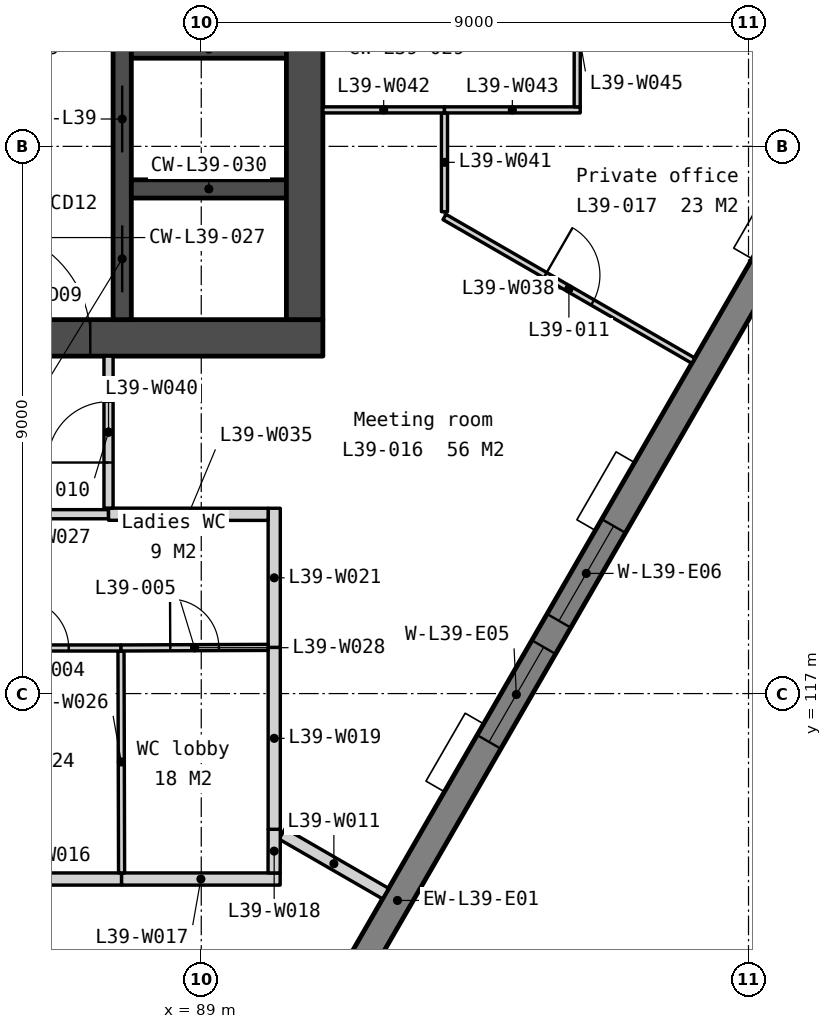
"""IFC4 building model, lengths in metres.
Left out: names, types, materials, properties, quantities, classifications, styles, units other than length and angle.
Written with IfcOpenShell. Run it as: python <this file> out.ifc"""

import sys

from ifc_helpers import new_model, si_unit, direction, frame, frame_2d, origin, place, context, subcontext, project, spatial, polyline, rectangle, outline, extrude, element, fill, save


model = new_model("IFC4")
c1 = context("Model", 3, precision=1e-05, world=origin(), true_north=direction((0.0, 1.0)))
c2 = subcontext(c1, "Body", "Model", "MODEL_VIEW")
j1 = project(units=[si_unit("LENGTHUNIT", "METRE"), si_unit("PLANEANGLEUNIT", "RADIAN")], contexts=[c1])
p1 = place(None, origin())
s1 = spatial("IfcSite", under=j1, at=p1, CompositionType="ELEMENT")
p2 = place(p1, origin())
s2 = spatial("IfcBuilding", under=s1, at=p2, CompositionType="ELEMENT")
p3 = place(p2, frame((0.0, 0.0, 155.9)))
s3 = spatial("IfcBuildingStorey", under=s2, at=p3, CompositionType="ELEMENT", Elevation=155.9)
p4 = place(p3, frame((69.0, 122.85, 0.0), z_axis=(0.0, 0.0, 1.0), x_axis=(1.0, 0.0, 0.0)))
e1 = element("IfcWall", 1, at=p4, inside=s3, PredefinedType="SOLIDWALL", context=c2, shape_type="SweptSolid", body=[
    extrude(rectangle(XDim=22.0, YDim=0.6, at=frame_2d((11.0, 0.0))), origin(), (0.0, 0.0, 1.0), 3.75),
])
p5 = place(p4, frame((16.375, 0.0, 0.0)))
e2 = element("IfcOpeningElement", 2, at=p5, cuts=e1, PredefinedType="OPENING", context=c2, shape_type="SweptSolid", body=[
    extrude(rectangle(XDim=1.8, YDim=2.1, at=frame_2d((0.9, 1.05))), frame((0.0, 0.31, 0.0), z_axis=(0.0, -1.0, 0.0), x_axis=(1.0, 0.0, 0.0)), (0.0, 0.0, 1.0), 0.62),
])
p6 = place(p4, frame((3.825, 0.0, 0.0)))
e3 = element("IfcOpeningElement", 3, at=p6, cuts=e1, PredefinedType="OPENING", context=c2, shape_type="SweptSolid", body=[
    extrude(rectangle(XDim=1.8, YDim=2.1, at=frame_2d((0.9, 1.05))), frame((0.0, 0.31, 0.0), z_axis=(0.0, -1.0, 0.0), x_axis=(1.0, 0.0, 0.0)), (0.0, 0.0, 1.0), 0.62),
])
p7 = place(p4, frame((12.85, 0.0, 0.0)))
e4 = element("IfcOpeningElement", 4, at=p7, cuts=e1, PredefinedType="OPENING", context=c2, shape_type="SweptSolid", body=[
    extrude(rectangle(XDim=1.5, YDim=2.1, at=frame_2d((0.75, 1.05))), frame((0.0, 0.31, 0.0), z_axis=(0.0, -1.0, 0.0), x_axis=(1.0, 0.0, 0.0)), (0.0, 0.0, 1.0), 0.62),
])
p8 = place(p3, frame((87.7, 133.95, 0.0), z_axis=(0.0, 0.0, 1.0), x_axis=(0.0, -1.0, 0.0)))
e5 = element("IfcWall", 5, at=p8, inside=s3, PredefinedType="SOLIDWALL", context=c2, shape_type="SweptSolid", body=[
    extrude(rectangle(XDim=10.8, YDim=0.3, at=frame_2d((5.4, 0.0))), origin(), (0.0, 0.0, 1.0), 3.75),
])
p9 = place(p8, frame((6.95, 0.0, 0.0)))
e6 = element("IfcOpeningElement", 6, at=p9, cuts=e5, PredefinedType="OPENING", context=c2, shape_type="SweptSolid", body=[
    extrude(rectangle(XDim=1.1, YDim=2.1, at=frame_2d((0.55, 1.05))), frame((0.0, 0.16, 0.0), z_axis=(0.0, -1.0, 0.0), x_axis=(1.0, 0.0, 0.0)), (0.0, 0.0, 1.0), 0.32),
])
p10 = place(p8, frame((5.1, 0.0, 0.0)))
e7 = element("IfcOpeningElement", 7, at=p10, cuts=e5, PredefinedType="OPENING", context=c2, shape_type="SweptSolid", body=[
    extrude(rectangle(XDim=1.0, YDim=2.1, at=frame_2d((0.5, 1.05))), frame((0.0, 0.16, 0.0), z_axis=(0.0, -1.0, 0.0), x_axis=(1.0, 0.0, 0.0)), (0.0, 0.0, 1.0), 0.32),
])
p11 = place(p8, frame((9.25, 0.0, 0.0)))
e8 = element("IfcOpeningElement", 8, at=p11, cuts=e5, PredefinedType="OPENING", context=c2, shape_type="SweptSolid", body=[
    extrude(rectangle(XDim=1.1, YDim=2.1, at=frame_2d((0.55, 1.05))), frame((0.0, 0.16, 0.0), z_axis=(0.0, -1.0, 0.0), x_axis=(1.0, 0.0, 0.0)), (0.0, 0.0, 1.0), 0.32),
])
for number, where, z_axis, x_axis in (
    (9, (87.85, 127.6, 0.0), (0.0, 0.0, 1.0), (1.0, 0.0, 0.0)),
    (10, (87.85, 125.3, 0.0), (0.0, 0.0, 1.0), (1.0, 0.0, 0.0)),
):
    element("IfcWall", number, at=place(p3, frame(where, z_axis=z_axis, x_axis=x_axis)), inside=s3, PredefinedType="SOLIDWALL", context=c2, shape_type="SweptSolid", body=[
        extrude(rectangle(XDim=2.55, YDim=0.3, at=frame_2d((1.275, 0.0))), origin(), (0.0, 0.0, 1.0), 3.75),
    ])
p12 = place(p3, frame((90.7, 133.95, 0.0), z_axis=(0.0, 0.0, 1.0), x_axis=(0.0, -1.0, 0.0)))
e11 = element("IfcWall", 11, at=p12, inside=s3, PredefinedType="SOLIDWALL", context=c2, shape_type="SweptSolid", body=[
    extrude(rectangle(XDim=10.8, YDim=0.6, at=frame_2d((5.4, 0.0))), origin(), (0.0, 0.0, 1.0), 3.75),
])
p13 = place(p3, frame((82.105, 96.067, -0.15), z_axis=(0.0, 0.0, 1.0), x_axis=(0.499997369791, 0.866026922331, 0.0)))
e12 = element("IfcWall", 12, at=p13, inside=s3, PredefinedType="SOLIDWALL", context=c2, shape_type="SweptSolid", body=[
    extrude(outline(polyline([(40.486, 0.0), (40.486, 3.9), (0.0, 3.9), (0.0, 0.0), (40.486, 0.0)])), frame((0.0, 0.225, 0.0), z_axis=(0.0, -1.0, 0.0), x_axis=(1.0, 0.0, 0.0)), (0.0, 0.0, 1.0), 0.45),
])
p14 = place(p13, frame((3.011, 0.0, 0.95)))
e13 = element("IfcOpeningElement", 13, at=p14, cuts=e12, PredefinedType="OPENING", context=c2, shape_type="SweptSolid", body=[
    extrude(rectangle(XDim=1.8, YDim=2.2, at=frame_2d((0.9, 1.1))), frame((0.0, 0.235, 0.0), z_axis=(0.0, -1.0, 0.0), x_axis=(1.0, 0.0, 0.0)), (0.0, 0.0, 1.0), 0.47),
])
p15 = place(p13, frame((5.311, 0.0, 0.95)))
e14 = element("IfcOpeningElement", 14, at=p15, cuts=e12, PredefinedType="OPENING", context=c2, shape_type="SweptSolid", body=[
    extrude(rectangle(XDim=1.8, YDim=2.2, at=frame_2d((0.9, 1.1))), frame((0.0, 0.235, 0.0), z_axis=(0.0, -1.0, 0.0), x_axis=(1.0, 0.0, 0.0)), (0.0, 0.0, 1.0), 0.47),
])
p16 = place(p13, frame((13.132, 0.0, 0.95)))
e15 = element("IfcOpeningElement", 15, at=p16, cuts=e12, PredefinedType="OPENING", context=c2, shape_type="SweptSolid", body=[
    extrude(rectangle(XDim=1.8, YDim=2.2, at=frame_2d((0.9, 1.1))), frame((0.0, 0.235, 0.0), z_axis=(0.0, -1.0, 0.0), x_axis=(1.0, 0.0, 0.0)), (0.0, 0.0, 1.0), 0.47),
])
p17 = place(p13, frame((15.432, 0.0, 0.95)))
e16 = element("IfcOpeningElement", 16, at=p17, cuts=e12, PredefinedType="OPENING", context=c2, shape_type="SweptSolid", body=[
    extrude(rectangle(XDim=1.8, YDim=2.2, at=frame_2d((0.9, 1.1))), frame((0.0, 0.235, 0.0), z_axis=(0.0, -1.0, 0.0), x_axis=(1.0, 0.0, 0.0)), (0.0, 0.0, 1.0), 0.47),
])
p18 = place(p13, frame((23.254, 0.0, 0.95)))
e17 = element("IfcOpeningElement", 17, at=p18, cuts=e12, PredefinedType="OPENING", context=c2, shape_type="SweptSolid", body=[
    extrude(rectangle(XDim=1.8, YDim=2.2, at=frame_2d((0.9, 1.1))), frame((0.0, 0.235, 0.0), z_axis=(0.0, -1.0, 0.0), x_axis=(1.0, 0.0, 0.0)), (0.0, 0.0, 1.0), 0.47),
])
p19 = place(p13, frame((25.554, 0.0, 0.95)))
e18 = element("IfcOpeningElement", 18, at=p19, cuts=e12, PredefinedType="OPENING", context=c2, shape_type="SweptSolid", body=[
    extrude(rectangle(XDim=1.8, YDim=2.2, at=frame_2d((0.9, 1.1))), frame((0.0, 0.235, 0.0), z_axis=(0.0, -1.0, 0.0), x_axis=(1.0, 0.0, 0.0)), (0.0, 0.0, 1.0), 0.47),
])
p20 = place(p13, frame((33.375, 0.0, 0.95)))
e19 = element("IfcOpeningElement", 19, at=p20, cuts=e12, PredefinedType="OPENING", context=c2, shape_type="SweptSolid", body=[
    extrude(rectangle(XDim=1.8, YDim=2.2, at=frame_2d((0.9, 1.1))), frame((0.0, 0.235, 0.0), z_axis=(0.0, -1.0, 0.0), x_axis=(1.0, 0.0, 0.0)), (0.0, 0.0, 1.0), 0.47),
])
p21 = place(p13, frame((35.675, 0.0, 0.95)))
e20 = element("IfcOpeningElement", 20, at=p21, cuts=e12, PredefinedType="OPENING", context=c2, shape_type="SweptSolid", body=[
    extrude(rectangle(XDim=1.8, YDim=2.2, at=frame_2d((0.9, 1.1))), frame((0.0, 0.235, 0.0), z_axis=(0.0, -1.0, 0.0), x_axis=(1.0, 0.0, 0.0)), (0.0, 0.0, 1.0), 0.47),
])
p22 = place(p3, frame((90.33, 114.693, 0.0), z_axis=(0.0, 0.0, 1.0), x_axis=(0.866009734793, -0.500027138508, 0.0)))
e21 = element("IfcWall", 21, at=p22, inside=s3, PredefinedType="PARTITIONING", context=c2, shape_type="SweptSolid", body=[
    extrude(rectangle(XDim=1.965, YDim=0.2, at=frame_2d((0.983, 0.0))), origin(), (0.0, 0.0, 1.0), 3.75),
])
p23 = place(p3, frame((85.15, 113.95, 0.0), z_axis=(0.0, 0.0, 1.0), x_axis=(1.0, 0.0, 0.0)))
e22 = element("IfcWall", 22, at=p23, inside=s3, PredefinedType="PARTITIONING", context=c2, shape_type="SweptSolid", body=[
    extrude(rectangle(XDim=2.54, YDim=0.2, at=frame_2d((1.27, 0.0))), origin(), (0.0, 0.0, 1.0), 3.75),
])
p24 = place(p3, frame((87.69, 113.95, 0.0), z_axis=(0.0, 0.0, 1.0), x_axis=(1.0, 0.0, 0.0)))
e23 = element("IfcWall", 23, at=p24, inside=s3, PredefinedType="PARTITIONING", context=c2, shape_type="SweptSolid", body=[
    extrude(rectangle(XDim=2.608, YDim=0.2, at=frame_2d((1.304, 0.0))), origin(), (0.0, 0.0, 1.0), 3.75),
])
p25 = place(p3, frame((90.198, 114.05, 0.0), z_axis=(0.0, 0.0, 1.0), x_axis=(0.002380945632, 0.999997165545, 0.0)))
e24 = element("IfcWall", 24, at=p25, inside=s3, PredefinedType="PARTITIONING", context=c2, shape_type="SweptSolid", body=[
    extrude(rectangle(XDim=0.718, YDim=0.2, at=frame_2d((0.359, 0.0))), origin(), (0.0, 0.0, 1.0), 3.75),
])
p26 = place(p3, frame((90.2, 114.768, 0.0), z_axis=(0.0, 0.0, 1.0), x_axis=(0.0, 1.0, 0.0)))
e25 = element("IfcWall", 25, at=p26, inside=s3, PredefinedType="PARTITIONING", context=c2, shape_type="SweptSolid", body=[
    extrude(rectangle(XDim=2.992, YDim=0.2, at=frame_2d((1.496, 0.0))), origin(), (0.0, 0.0, 1.0), 3.75),
])
p27 = place(p3, frame((90.2, 117.76, 0.0), z_axis=(0.0, 0.0, 1.0), x_axis=(0.0, 1.0, 0.0)))
e26 = element("IfcWall", 26, at=p27, inside=s3, PredefinedType="PARTITIONING", context=c2, shape_type="SweptSolid", body=[
    extrude(rectangle(XDim=2.288, YDim=0.2, at=frame_2d((1.144, 0.0))), origin(), (0.0, 0.0, 1.0), 3.75),
])
p28 = place(p3, frame((87.69, 114.05, 0.0), z_axis=(0.0, 0.0, 1.0), x_axis=(-0.002608686776, 0.999996597371, 0.0)))
e27 = element("IfcWall", 27, at=p28, inside=s3, PredefinedType="PARTITIONING", context=c2, shape_type="SweptSolid", body=[
    extrude(rectangle(XDim=3.65, YDim=0.1, at=frame_2d((1.825, 0.0))), origin(), (0.0, 0.0, 1.0), 3.75),
])
p29 = place(p3, frame((85.16, 117.75, 0.0), z_axis=(0.0, 0.0, 1.0), x_axis=(1.0, 0.0, 0.0)))
e28 = element("IfcWall", 28, at=p29, inside=s3, PredefinedType="PARTITIONING", context=c2, shape_type="SweptSolid", body=[
    extrude(rectangle(XDim=2.52, YDim=0.1, at=frame_2d((1.26, 0.0))), origin(), (0.0, 0.0, 1.0), 3.75),
])
p30 = place(p29, frame((0.86, 0.0, 0.0)))
e29 = element("IfcOpeningElement", 29, at=p30, cuts=e28, PredefinedType="OPENING", context=c2, shape_type="SweptSolid", body=[
    extrude(rectangle(XDim=0.8, YDim=2.1, at=frame_2d((0.4, 1.05))), frame((0.0, 0.06, 0.0), z_axis=(0.0, -1.0, 0.0), x_axis=(1.0, 0.0, 0.0)), (0.0, 0.0, 1.0), 0.12),
])
p31 = place(p3, frame((87.68, 117.75, 0.0), z_axis=(0.0, 0.0, 1.0), x_axis=(0.999992261016, 0.003934197335, 0.0)))
e30 = element("IfcWall", 30, at=p31, inside=s3, PredefinedType="PARTITIONING", context=c2, shape_type="SweptSolid", body=[
    extrude(rectangle(XDim=2.42, YDim=0.1, at=frame_2d((1.21, 0.0))), origin(), (0.0, 0.0, 1.0), 3.75),
])
p32 = place(p31, frame((0.81, 0.0, 0.0)))
e31 = element("IfcOpeningElement", 31, at=p32, cuts=e30, PredefinedType="OPENING", context=c2, shape_type="SweptSolid", body=[
    extrude(rectangle(XDim=0.8, YDim=2.1, at=frame_2d((0.4, 1.05))), frame((0.0, 0.06, 0.0), z_axis=(0.0, -1.0, 0.0), x_axis=(1.0, 0.0, 0.0)), (0.0, 0.0, 1.0), 0.12),
])
p33 = place(p3, frame((81.2, 119.95, 0.0), z_axis=(0.0, 0.0, 1.0), x_axis=(1.0, 0.0, 0.0)))
e32 = element("IfcWall", 32, at=p33, inside=s3, PredefinedType="PARTITIONING", context=c2, shape_type="SweptSolid", body=[
    extrude(rectangle(XDim=6.275, YDim=0.15, at=frame_2d((3.138, 0.0))), origin(), (0.0, 0.0, 1.0), 3.75),
])
p34 = place(p33, frame((2.637, 0.0, 0.0)))
e33 = element("IfcOpeningElement", 33, at=p34, cuts=e32, PredefinedType="OPENING", context=c2, shape_type="SweptSolid", body=[
    extrude(rectangle(XDim=1.0, YDim=2.1, at=frame_2d((0.5, 1.05))), frame((0.0, 0.085, 0.0), z_axis=(0.0, -1.0, 0.0), x_axis=(1.0, 0.0, 0.0)), (0.0, 0.0, 1.0), 0.17),
])
p35 = place(p3, frame((87.475, 119.95, 0.0), z_axis=(0.0, 0.0, 1.0), x_axis=(0.999999723197, -0.000744047413, 0.0)))
e34 = element("IfcWall", 34, at=p35, inside=s3, PredefinedType="PARTITIONING", context=c2, shape_type="SweptSolid", body=[
    extrude(rectangle(XDim=2.625, YDim=0.2, at=frame_2d((1.312, 0.0))), origin(), (0.0, 0.0, 1.0), 3.75),
])
p36 = place(p3, frame((93.0, 124.839, 0.0), z_axis=(0.0, 0.0, 1.0), x_axis=(0.866028145587, -0.499995251029, 0.0)))
e35 = element("IfcWall", 35, at=p36, inside=s3, PredefinedType="PARTITIONING", context=c2, shape_type="SweptSolid", body=[
    extrude(rectangle(XDim=4.726, YDim=0.1, at=frame_2d((2.363, 0.0))), origin(), (0.0, 0.0, 1.0), 3.75),
])
p37 = place(p36, frame((1.913, 0.0, 0.0)))
e36 = element("IfcOpeningElement", 36, at=p37, cuts=e35, PredefinedType="OPENING", context=c2, shape_type="SweptSolid", body=[
    extrude(rectangle(XDim=0.9, YDim=2.1, at=frame_2d((0.45, 1.05))), frame((0.0, 0.06, 0.0), z_axis=(0.0, -1.0, 0.0), x_axis=(1.0, 0.0, 0.0)), (0.0, 0.0, 1.0), 0.12),
])
p38 = place(p3, frame((87.475, 120.05, 0.0), z_axis=(0.0, 0.0, 1.0), x_axis=(0.0, 1.0, 0.0)))
e37 = element("IfcWall", 37, at=p38, inside=s3, PredefinedType="PARTITIONING", context=c2, shape_type="SweptSolid", body=[
    extrude(rectangle(XDim=2.5, YDim=0.15, at=frame_2d((1.25, 0.0))), origin(), (0.0, 0.0, 1.0), 3.75),
])
p39 = place(p38, frame((0.75, 0.0, 0.0)))
e38 = element("IfcOpeningElement", 38, at=p39, cuts=e37, PredefinedType="OPENING", context=c2, shape_type="SweptSolid", body=[
    extrude(rectangle(XDim=1.0, YDim=2.1, at=frame_2d((0.5, 1.05))), frame((0.0, 0.085, 0.0), z_axis=(0.0, -1.0, 0.0), x_axis=(1.0, 0.0, 0.0)), (0.0, 0.0, 1.0), 0.17),
])
p40 = place(p3, frame((93.0, 124.925, 0.0), z_axis=(0.0, 0.0, 1.0), x_axis=(0.0, 1.0, 0.0)))
e39 = element("IfcWall", 39, at=p40, inside=s3, PredefinedType="PARTITIONING", context=c2, shape_type="SweptSolid", body=[
    extrude(rectangle(XDim=1.625, YDim=0.1, at=frame_2d((0.812, 0.0))), origin(), (0.0, 0.0, 1.0), 3.75),
])
p41 = place(p3, frame((91.0, 126.6, 0.0), z_axis=(0.0, 0.0, 1.0), x_axis=(1.0, 0.0, 0.0)))
e40 = element("IfcWall", 40, at=p41, inside=s3, PredefinedType="PARTITIONING", context=c2, shape_type="SweptSolid", body=[
    extrude(rectangle(XDim=2.0, YDim=0.1, at=frame_2d((1.0, 0.0))), origin(), (0.0, 0.0, 1.0), 3.75),
])
p42 = place(p3, frame((93.0, 126.6, 0.0), z_axis=(0.0, 0.0, 1.0), x_axis=(1.0, 0.0, 0.0)))
e41 = element("IfcWall", 41, at=p42, inside=s3, PredefinedType="PARTITIONING", context=c2, shape_type="SweptSolid", body=[
    extrude(rectangle(XDim=2.232, YDim=0.1, at=frame_2d((1.116, 0.0))), origin(), (0.0, 0.0, 1.0), 3.75),
])
p43 = place(p3, frame((95.185, 129.421, 0.0), z_axis=(0.0, 0.0, 1.0), x_axis=(0.866034781647, -0.499983756713, 0.0)))
e42 = element("IfcWall", 42, at=p43, inside=s3, PredefinedType="PARTITIONING", context=c2, shape_type="SweptSolid", body=[
    extrude(rectangle(XDim=5.122, YDim=0.1, at=frame_2d((2.561, 0.0))), origin(), (0.0, 0.0, 1.0), 3.75),
])
p44 = place(p43, frame((2.111, 0.0, 0.0)))
e43 = element("IfcOpeningElement", 43, at=p44, cuts=e42, PredefinedType="OPENING", context=c2, shape_type="SweptSolid", body=[
    extrude(rectangle(XDim=0.9, YDim=2.1, at=frame_2d((0.45, 1.05))), frame((0.0, 0.06, 0.0), z_axis=(0.0, -1.0, 0.0), x_axis=(1.0, 0.0, 0.0)), (0.0, 0.0, 1.0), 0.12),
])
p45 = place(p3, frame((95.182, 126.65, 0.0), z_axis=(0.0, 0.0, 1.0), x_axis=(0.001091404534, 0.999999404418, 0.0)))
e44 = element("IfcWall", 44, at=p45, inside=s3, PredefinedType="PARTITIONING", context=c2, shape_type="SweptSolid", body=[
    extrude(rectangle(XDim=2.684, YDim=0.1, at=frame_2d((1.342, 0.0))), origin(), (0.0, 0.0, 1.0), 3.75),
])
p46 = place(p9, origin())
e45 = element("IfcDoor", 45, at=p46, inside=s3, OperationType="SLIDING_TO_LEFT", PredefinedType="DOOR", context=c2, shape_type="SweptSolid", body=[
    extrude(rectangle(XDim=1.1, YDim=2.1, at=frame_2d((0.55, 1.05))), frame((0.0, 0.025, 0.0), z_axis=(0.0, -1.0, 0.0), x_axis=(1.0, 0.0, 0.0)), (0.0, 0.0, 1.0), 0.05),
])
fill(e6, e45)
p47 = place(p5, origin())
e46 = element("IfcDoor", 46, at=p47, inside=s3, OperationType="DOUBLE_DOOR_DOUBLE_SWING", PredefinedType="DOOR", context=c2, shape_type="SweptSolid", body=[
    extrude(rectangle(XDim=1.8, YDim=2.1, at=frame_2d((0.9, 1.05))), frame((0.0, 0.025, 0.0), z_axis=(0.0, -1.0, 0.0), x_axis=(1.0, 0.0, 0.0)), (0.0, 0.0, 1.0), 0.05),
])
fill(e2, e46)
p48 = place(p11, origin())
e47 = element("IfcDoor", 47, at=p48, inside=s3, OperationType="SLIDING_TO_LEFT", PredefinedType="DOOR", context=c2, shape_type="SweptSolid", body=[
    extrude(rectangle(XDim=1.1, YDim=2.1, at=frame_2d((0.55, 1.05))), frame((0.0, 0.025, 0.0), z_axis=(0.0, -1.0, 0.0), x_axis=(1.0, 0.0, 0.0)), (0.0, 0.0, 1.0), 0.05),
])
fill(e8, e47)
p49 = place(p18, origin())
e48 = element("IfcWindow", 48, at=p49, inside=s3, PartitioningType="SINGLE_PANEL", PredefinedType="WINDOW", context=c2, shape_type="SweptSolid", body=[
    extrude(rectangle(XDim=1.8, YDim=2.2, at=frame_2d((0.9, 1.1))), frame((0.0, 0.03, 0.0), z_axis=(0.0, -1.0, 0.0), x_axis=(1.0, 0.0, 0.0)), (0.0, 0.0, 1.0), 0.06),
])
fill(e17, e48)
p50 = place(p19, origin())
e49 = element("IfcWindow", 49, at=p50, inside=s3, PartitioningType="SINGLE_PANEL", PredefinedType="WINDOW", context=c2, shape_type="SweptSolid", body=[
    extrude(rectangle(XDim=1.8, YDim=2.2, at=frame_2d((0.9, 1.1))), frame((0.0, 0.03, 0.0), z_axis=(0.0, -1.0, 0.0), x_axis=(1.0, 0.0, 0.0)), (0.0, 0.0, 1.0), 0.06),
])
fill(e18, e49)
p51 = place(p30, origin())
e50 = element("IfcDoor", 50, at=p51, inside=s3, OperationType="SINGLE_SWING_LEFT", PredefinedType="DOOR", context=c2, shape_type="SweptSolid", body=[
    extrude(rectangle(XDim=0.8, YDim=2.1, at=frame_2d((0.4, 1.05))), frame((0.0, 0.025, 0.0), z_axis=(0.0, -1.0, 0.0), x_axis=(1.0, 0.0, 0.0)), (0.0, 0.0, 1.0), 0.05),
])
fill(e29, e50)
p52 = place(p32, origin())
e51 = element("IfcDoor", 51, at=p52, inside=s3, OperationType="SINGLE_SWING_LEFT", PredefinedType="DOOR", context=c2, shape_type="SweptSolid", body=[
    extrude(rectangle(XDim=0.8, YDim=2.1, at=frame_2d((0.4, 1.05))), frame((0.0, 0.025, 0.0), z_axis=(0.0, -1.0, 0.0), x_axis=(1.0, 0.0, 0.0)), (0.0, 0.0, 1.0), 0.05),
])
fill(e31, e51)
p53 = place(p39, origin())
e52 = element("IfcDoor", 52, at=p53, inside=s3, OperationType="SINGLE_SWING_LEFT", PredefinedType="DOOR", context=c2, shape_type="SweptSolid", body=[
    extrude(rectangle(XDim=1.0, YDim=2.1, at=frame_2d((0.5, 1.05))), frame((0.0, 0.025, 0.0), z_axis=(0.0, -1.0, 0.0), x_axis=(1.0, 0.0, 0.0)), (0.0, 0.0, 1.0), 0.05),
])
fill(e38, e52)
p54 = place(p37, origin())
e53 = element("IfcDoor", 53, at=p54, inside=s3, OperationType="SINGLE_SWING_LEFT", PredefinedType="DOOR", context=c2, shape_type="SweptSolid", body=[
    extrude(rectangle(XDim=0.9, YDim=2.1, at=frame_2d((0.45, 1.05))), frame((0.0, 0.025, 0.0), z_axis=(0.0, -1.0, 0.0), x_axis=(1.0, 0.0, 0.0)), (0.0, 0.0, 1.0), 0.05),
])
fill(e36, e53)
save(model, sys.argv[1])
